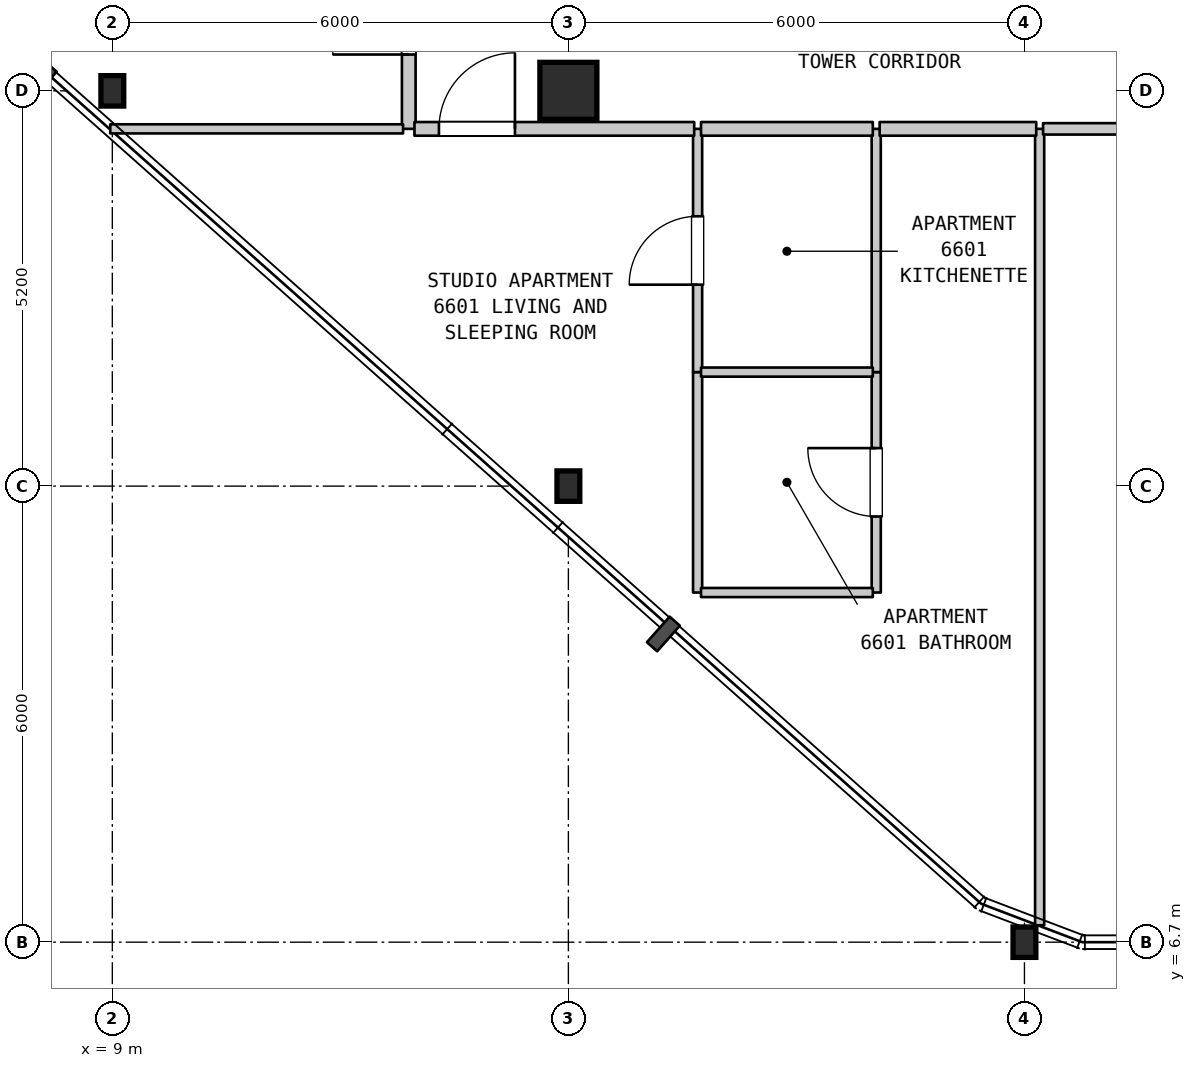
"""IFC4 building model, lengths in metres.
Left out: names, types, materials, properties, quantities, classifications, styles, units other than length and angle.
Written with IfcOpenShell. Run it as: python <this file> out.ifc"""

import sys

from ifc_helpers import new_model, si_unit, direction, frame, frame_2d, origin, origin_2d, place, context, subcontext, project, spatial, rectangle, i_section, extrude, element, fill, save


model = new_model("IFC4")
c1 = context("Model", 3, precision=1e-05, world=origin(), true_north=direction((0.0, 1.0)))
c2 = subcontext(c1, "Body", "Model", "MODEL_VIEW")
j1 = project(units=[si_unit("LENGTHUNIT", "METRE"), si_unit("PLANEANGLEUNIT", "RADIAN")], contexts=[c1])
p1 = place(None, origin())
s1 = spatial("IfcSite", under=j1, at=p1, CompositionType="ELEMENT")
p2 = place(p1, origin())
s2 = spatial("IfcBuilding", under=s1, at=p2, CompositionType="ELEMENT")
p3 = place(p2, frame((0.0, 0.0, 265.8)))
s3 = spatial("IfcBuildingStorey", under=s2, at=p3, CompositionType="ELEMENT", Elevation=265.8)
for number, where, z_axis, x_axis in (
    (1, (9.0, 17.9, 0.0), (0.0, 0.0, 1.0), (1.0, 0.0, 0.0)),
    (2, (15.0, 12.7, 0.0), (0.0, 0.0, 1.0), (1.0, 0.0, 0.0)),
):
    element("IfcColumn", number, at=place(p3, frame(where, z_axis=z_axis, x_axis=x_axis)), inside=s3, PredefinedType="COLUMN", context=c2, shape_type="SweptSolid", body=[
        extrude(i_section(OverallWidth=0.3, OverallDepth=0.4, WebThickness=0.013, FlangeThickness=0.024, FilletRadius=0.027, at=origin_2d()), origin(), (0.0, 0.0, 1.0), 3.7),
    ])
p4 = place(p3, frame((15.0, 17.9, 0.0), z_axis=(0.0, 0.0, 1.0), x_axis=(1.0, 0.0, 0.0)))
e3 = element("IfcColumn", 3, at=p4, inside=s3, PredefinedType="COLUMN", context=c2, shape_type="SweptSolid", body=[
    extrude(rectangle(XDim=0.75, YDim=0.75, at=origin_2d()), origin(), (0.0, 0.0, 1.0), 3.7),
])
p5 = place(p3, frame((21.0, 6.7, 0.0), z_axis=(0.0, 0.0, 1.0), x_axis=(1.0, 0.0, 0.0)))
e4 = element("IfcColumn", 4, at=p5, inside=s3, PredefinedType="COLUMN", context=c2, shape_type="SweptSolid", body=[
    extrude(i_section(OverallWidth=0.3, OverallDepth=0.4, WebThickness=0.013, FlangeThickness=0.024, FilletRadius=0.027, at=origin_2d()), origin(), (0.0, 0.0, 1.0), 3.7),
])
p6 = place(p3, frame((12.9, 17.4, 0.0), z_axis=(0.0, 0.0, 1.0), x_axis=(0.0, 1.0, 0.0)))
e5 = element("IfcWall", 5, at=p6, inside=s3, PredefinedType="STANDARD", context=c2, shape_type="SweptSolid", body=[
    extrude(rectangle(XDim=3.1, YDim=0.18, at=frame_2d((1.55, 0.0))), origin(), (0.0, 0.0, 1.0), 3.39),
])
p7 = place(p6, frame((0.978, 0.0, 0.0)))
e6 = element("IfcOpeningElement", 6, at=p7, cuts=e5, PredefinedType="OPENING", context=c2, shape_type="SweptSolid", body=[
    extrude(rectangle(XDim=1.0, YDim=2.15, at=frame_2d((0.5, 1.075))), frame((0.0, 0.1, 0.0), z_axis=(0.0, -1.0, 0.0), x_axis=(1.0, 0.0, 0.0)), (0.0, 0.0, 1.0), 0.2),
])
p8 = place(p3, frame((16.7, 11.3, 0.0), z_axis=(0.0, 0.0, 1.0), x_axis=(0.0, 1.0, 0.0)))
e7 = element("IfcWall", 7, at=p8, inside=s3, PredefinedType="PARTITIONING", context=c2, shape_type="SweptSolid", body=[
    extrude(rectangle(XDim=2.9, YDim=0.12, at=frame_2d((1.45, 0.0))), origin(), (0.0, 0.0, 1.0), 3.39),
])
p9 = place(p3, frame((16.7, 14.2, 0.0), z_axis=(0.0, 0.0, 1.0), x_axis=(0.0, 1.0, 0.0)))
e8 = element("IfcWall", 8, at=p9, inside=s3, PredefinedType="PARTITIONING", context=c2, shape_type="SweptSolid", body=[
    extrude(rectangle(XDim=3.2, YDim=0.12, at=frame_2d((1.6, 0.0))), origin(), (0.0, 0.0, 1.0), 3.39),
])
p10 = place(p9, frame((1.15, 0.0, 0.0)))
e9 = element("IfcOpeningElement", 9, at=p10, cuts=e8, PredefinedType="OPENING", context=c2, shape_type="SweptSolid", body=[
    extrude(rectangle(XDim=0.9, YDim=2.15, at=frame_2d((0.45, 1.075))), frame((0.0, 0.07, 0.0), z_axis=(0.0, -1.0, 0.0), x_axis=(1.0, 0.0, 0.0)), (0.0, 0.0, 1.0), 0.14),
])
p11 = place(p3, frame((19.05, 11.3, 0.0), z_axis=(0.0, 0.0, 1.0), x_axis=(0.0, 1.0, 0.0)))
e10 = element("IfcWall", 10, at=p11, inside=s3, PredefinedType="PARTITIONING", context=c2, shape_type="SweptSolid", body=[
    extrude(rectangle(XDim=2.9, YDim=0.12, at=frame_2d((1.45, 0.0))), origin(), (0.0, 0.0, 1.0), 3.39),
])
p12 = place(p11, frame((1.0, 0.0, 0.0)))
e11 = element("IfcOpeningElement", 11, at=p12, cuts=e10, PredefinedType="OPENING", context=c2, shape_type="SweptSolid", body=[
    extrude(rectangle(XDim=0.9, YDim=2.1, at=frame_2d((0.45, 1.05))), frame((0.0, 0.07, 0.0), z_axis=(0.0, -1.0, 0.0), x_axis=(1.0, 0.0, 0.0)), (0.0, 0.0, 1.0), 0.14),
])
p13 = place(p3, frame((19.05, 14.2, 0.0), z_axis=(0.0, 0.0, 1.0), x_axis=(0.0, 1.0, 0.0)))
e12 = element("IfcWall", 12, at=p13, inside=s3, PredefinedType="PARTITIONING", context=c2, shape_type="SweptSolid", body=[
    extrude(rectangle(XDim=3.2, YDim=0.12, at=frame_2d((1.6, 0.0))), origin(), (0.0, 0.0, 1.0), 3.39),
])
p14 = place(p3, frame((21.2, 6.923, 0.0), z_axis=(0.0, 0.0, 1.0), x_axis=(0.0, 1.0, 0.0)))
e13 = element("IfcWall", 13, at=p14, inside=s3, PredefinedType="PARTITIONING", context=c2, shape_type="SweptSolid", body=[
    extrude(rectangle(XDim=10.477, YDim=0.12, at=frame_2d((5.238, 0.0))), origin(), (0.0, 0.0, 1.0), 3.39),
])
for number, where, z_axis, x_axis in (
    (14, (16.745, 11.3, 0.0), (0.0, 0.0, 1.0), (1.0, 0.0, 0.0)),
    (15, (16.745, 14.2, 0.0), (0.0, 0.0, 1.0), (1.0, 0.0, 0.0)),
):
    element("IfcWall", number, at=place(p3, frame(where, z_axis=z_axis, x_axis=x_axis)), inside=s3, PredefinedType="PARTITIONING", context=c2, shape_type="SweptSolid", body=[
        extrude(rectangle(XDim=2.26, YDim=0.12, at=frame_2d((1.13, 0.0))), origin(), (0.0, 0.0, 1.0), 3.39),
    ])
p15 = place(p3, frame((8.973, 17.4, 0.0), z_axis=(0.0, 0.0, 1.0), x_axis=(1.0, 0.0, 0.0)))
e16 = element("IfcWall", 16, at=p15, inside=s3, PredefinedType="PARTITIONING", context=c2, shape_type="SweptSolid", body=[
    extrude(rectangle(XDim=3.852, YDim=0.12, at=frame_2d((1.926, 0.0))), origin(), (0.0, 0.0, 1.0), 3.39),
])
p16 = place(p3, frame((12.975, 17.4, 0.0), z_axis=(0.0, 0.0, 1.0), x_axis=(1.0, 0.0, 0.0)))
e17 = element("IfcWall", 17, at=p16, inside=s3, PredefinedType="STANDARD", context=c2, shape_type="SweptSolid", body=[
    extrude(rectangle(XDim=3.68, YDim=0.18, at=frame_2d((1.84, 0.0))), origin(), (0.0, 0.0, 1.0), 3.39),
])
p17 = place(p16, frame((0.322, 0.0, 0.0)))
e18 = element("IfcOpeningElement", 18, at=p17, cuts=e17, PredefinedType="OPENING", context=c2, shape_type="SweptSolid", body=[
    extrude(rectangle(XDim=1.0, YDim=2.15, at=frame_2d((0.5, 1.075))), frame((0.0, 0.1, 0.0), z_axis=(0.0, -1.0, 0.0), x_axis=(1.0, 0.0, 0.0)), (0.0, 0.0, 1.0), 0.2),
])
p18 = place(p3, frame((16.745, 17.4, 0.0), z_axis=(0.0, 0.0, 1.0), x_axis=(1.0, 0.0, 0.0)))
e19 = element("IfcWall", 19, at=p18, inside=s3, PredefinedType="STANDARD", context=c2, shape_type="SweptSolid", body=[
    extrude(rectangle(XDim=2.26, YDim=0.18, at=frame_2d((1.13, 0.0))), origin(), (0.0, 0.0, 1.0), 3.39),
])
p19 = place(p3, frame((19.095, 17.4, 0.0), z_axis=(0.0, 0.0, 1.0), x_axis=(1.0, 0.0, 0.0)))
e20 = element("IfcWall", 20, at=p19, inside=s3, PredefinedType="STANDARD", context=c2, shape_type="SweptSolid", body=[
    extrude(rectangle(XDim=2.06, YDim=0.18, at=frame_2d((1.03, 0.0))), origin(), (0.0, 0.0, 1.0), 3.39),
])
p20 = place(p3, frame((21.245, 17.4, 0.0), z_axis=(0.0, 0.0, 1.0), x_axis=(1.0, 0.0, 0.0)))
e21 = element("IfcWall", 21, at=p20, inside=s3, PredefinedType="STANDARD", context=c2, shape_type="SweptSolid", body=[
    extrude(rectangle(XDim=4.91, YDim=0.15, at=frame_2d((2.455, 0.0))), origin(), (0.0, 0.0, 1.0), 3.39),
])
p21 = place(p20, frame((1.884, 0.0, 0.0)))
e22 = element("IfcOpeningElement", 22, at=p21, cuts=e21, PredefinedType="OPENING", context=c2, shape_type="SweptSolid", body=[
    extrude(rectangle(XDim=1.0, YDim=2.15, at=frame_2d((0.5, 1.075))), frame((0.0, 0.085, 0.0), z_axis=(0.0, -1.0, 0.0), x_axis=(1.0, 0.0, 0.0)), (0.0, 0.0, 1.0), 0.17),
])
p22 = place(p7, origin())
e23 = element("IfcDoor", 23, at=p22, inside=s3, OperationType="SINGLE_SWING_LEFT", PredefinedType="DOOR", context=c2, shape_type="SweptSolid", body=[
    extrude(rectangle(XDim=1.0, YDim=2.15, at=frame_2d((0.5, 1.075))), frame((0.0, 0.025, 0.0), z_axis=(0.0, -1.0, 0.0), x_axis=(1.0, 0.0, 0.0)), (0.0, 0.0, 1.0), 0.05),
])
fill(e6, e23)
p23 = place(p10, origin())
e24 = element("IfcDoor", 24, at=p23, inside=s3, OperationType="SINGLE_SWING_LEFT", PredefinedType="DOOR", context=c2, shape_type="SweptSolid", body=[
    extrude(rectangle(XDim=0.9, YDim=2.15, at=frame_2d((0.45, 1.075))), frame((0.0, 0.025, 0.0), z_axis=(0.0, -1.0, 0.0), x_axis=(1.0, 0.0, 0.0)), (0.0, 0.0, 1.0), 0.05),
])
fill(e9, e24)
p24 = place(p12, origin())
e25 = element("IfcDoor", 25, at=p24, inside=s3, OperationType="SINGLE_SWING_RIGHT", PredefinedType="DOOR", context=c2, shape_type="SweptSolid", body=[
    extrude(rectangle(XDim=0.9, YDim=2.1, at=frame_2d((0.45, 1.05))), frame((0.0, 0.025, 0.0), z_axis=(0.0, -1.0, 0.0), x_axis=(1.0, 0.0, 0.0)), (0.0, 0.0, 1.0), 0.05),
])
fill(e11, e25)
p25 = place(p17, origin())
e26 = element("IfcDoor", 26, at=p25, inside=s3, OperationType="SINGLE_SWING_RIGHT", PredefinedType="DOOR", context=c2, shape_type="SweptSolid", body=[
    extrude(rectangle(XDim=1.0, YDim=2.15, at=frame_2d((0.5, 1.075))), frame((0.0, 0.025, 0.0), z_axis=(0.0, -1.0, 0.0), x_axis=(1.0, 0.0, 0.0)), (0.0, 0.0, 1.0), 0.05),
])
fill(e18, e26)
save(model, sys.argv[1])
